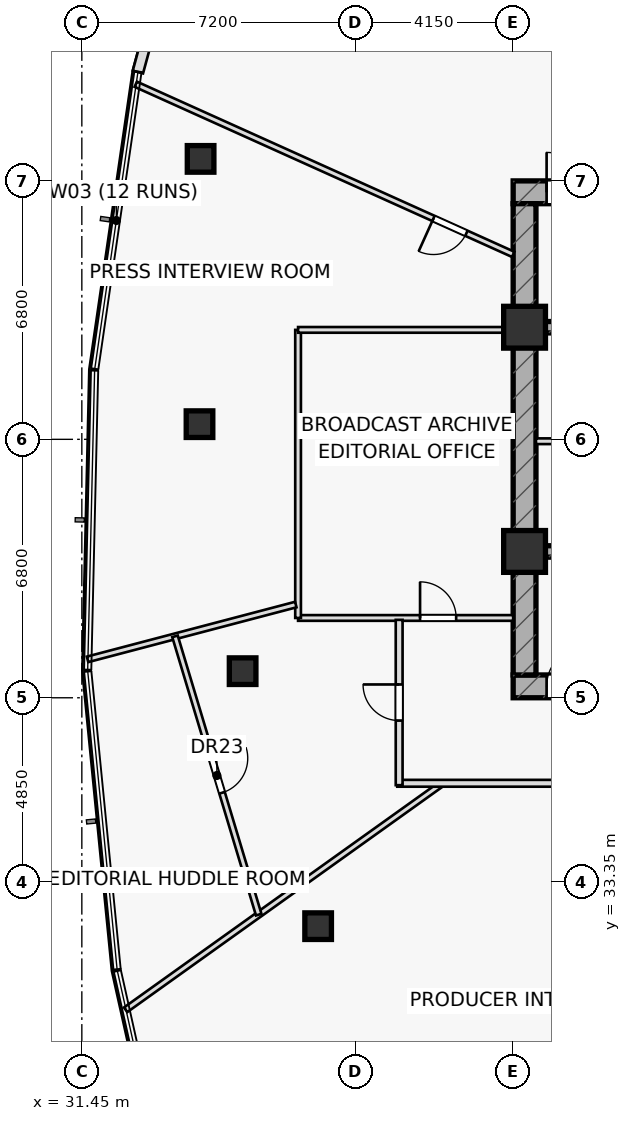
"""IFC4 building model, lengths in metres.
Left out: names, types, materials, properties, quantities, classifications, styles, units other than length and angle.
Written with IfcOpenShell. Run it as: python <this file> out.ifc"""

import sys

from ifc_helpers import new_model, si_unit, direction, frame, frame_2d, origin, origin_2d, place, context, subcontext, project, spatial, rectangle, hollow_rectangle, extrude, element, fill, save


model = new_model("IFC4")
c1 = context("Model", 3, precision=1e-05, world=origin(), true_north=direction((0.0, 1.0)))
c2 = subcontext(c1, "Body", "Model", "MODEL_VIEW")
j1 = project(units=[si_unit("LENGTHUNIT", "METRE"), si_unit("PLANEANGLEUNIT", "RADIAN")], contexts=[c1])
p1 = place(None, origin())
s1 = spatial("IfcSite", under=j1, at=p1, CompositionType="ELEMENT")
p2 = place(p1, origin())
s2 = spatial("IfcBuilding", under=s1, at=p2, CompositionType="ELEMENT")
p3 = place(p2, frame((0.0, 0.0, 138.7)))
s3 = spatial("IfcBuildingStorey", under=s2, at=p3, CompositionType="ELEMENT", Elevation=138.7)
p4 = place(p3, frame((42.8, 51.5, 0.0), z_axis=(0.0, 0.0, 1.0), x_axis=(1.0, 0.0, 0.0)))
e1 = element("IfcWall", 1, at=p4, inside=s3, PredefinedType="SHEAR", context=c2, shape_type="SweptSolid", body=[
    extrude(rectangle(XDim=14.4, YDim=0.6, at=frame_2d((7.2, 0.0))), origin(), (0.0, 0.0, 1.0), 3.55),
])
p5 = place(p4, frame((0.88, 0.0, 0.0)))
e2 = element("IfcOpeningElement", 2, at=p5, cuts=e1, PredefinedType="OPENING", context=c2, shape_type="SweptSolid", body=[
    extrude(rectangle(XDim=1.05, YDim=2.2, at=frame_2d((0.525, 1.1))), frame((0.0, 0.31, 0.0), z_axis=(0.0, -1.0, 0.0), x_axis=(1.0, 0.0, 0.0)), (0.0, 0.0, 1.0), 0.62),
])
p6 = place(p3, frame((42.8, 38.5, 0.0), z_axis=(0.0, 0.0, 1.0), x_axis=(1.0, 0.0, 0.0)))
e3 = element("IfcWall", 3, at=p6, inside=s3, PredefinedType="SHEAR", context=c2, shape_type="SweptSolid", body=[
    extrude(rectangle(XDim=14.4, YDim=0.6, at=frame_2d((7.2, 0.0))), origin(), (0.0, 0.0, 1.0), 3.55),
])
p7 = place(p6, frame((0.88, 0.0, 0.0)))
e4 = element("IfcOpeningElement", 4, at=p7, cuts=e3, PredefinedType="OPENING", context=c2, shape_type="SweptSolid", body=[
    extrude(rectangle(XDim=1.05, YDim=2.2, at=frame_2d((0.525, 1.1))), frame((0.0, 0.31, 0.0), z_axis=(0.0, -1.0, 0.0), x_axis=(1.0, 0.0, 0.0)), (0.0, 0.0, 1.0), 0.62),
])
p8 = place(p3, frame((43.1, 38.8, 0.0), z_axis=(0.0, 0.0, 1.0), x_axis=(0.0, 1.0, 0.0)))
e5 = element("IfcWall", 5, at=p8, inside=s3, PredefinedType="SHEAR", context=c2, shape_type="SweptSolid", body=[
    extrude(rectangle(XDim=12.4, YDim=0.6, at=frame_2d((6.2, 0.0))), origin(), (0.0, 0.0, 1.0), 3.55),
])
p9 = place(p3, frame((43.4, 47.95, 0.0), z_axis=(0.0, 0.0, 1.0), x_axis=(1.0, 0.0, 0.0)))
e6 = element("IfcWall", 6, at=p9, inside=s3, PredefinedType="SHEAR", context=c2, shape_type="SweptSolid", body=[
    extrude(rectangle(XDim=13.2, YDim=0.3, at=frame_2d((6.6, 0.0))), origin(), (0.0, 0.0, 1.0), 3.55),
])
p10 = place(p9, frame((8.345, 0.0, 0.0)))
e7 = element("IfcOpeningElement", 7, at=p10, cuts=e6, PredefinedType="OPENING", context=c2, shape_type="SweptSolid", body=[
    extrude(rectangle(XDim=1.15, YDim=2.2, at=frame_2d((0.575, 1.1))), frame((0.0, 0.16, 0.0), z_axis=(0.0, -1.0, 0.0), x_axis=(1.0, 0.0, 0.0)), (0.0, 0.0, 1.0), 0.32),
])
p11 = place(p9, frame((10.065, 0.0, 0.0)))
e8 = element("IfcOpeningElement", 8, at=p11, cuts=e6, PredefinedType="OPENING", context=c2, shape_type="SweptSolid", body=[
    extrude(rectangle(XDim=1.15, YDim=2.2, at=frame_2d((0.575, 1.1))), frame((0.0, 0.16, 0.0), z_axis=(0.0, -1.0, 0.0), x_axis=(1.0, 0.0, 0.0)), (0.0, 0.0, 1.0), 0.32),
])
p12 = place(p9, frame((11.645, 0.0, 0.0)))
e9 = element("IfcOpeningElement", 9, at=p12, cuts=e6, PredefinedType="OPENING", context=c2, shape_type="SweptSolid", body=[
    extrude(rectangle(XDim=1.15, YDim=2.2, at=frame_2d((0.575, 1.1))), frame((0.0, 0.16, 0.0), z_axis=(0.0, -1.0, 0.0), x_axis=(1.0, 0.0, 0.0)), (0.0, 0.0, 1.0), 0.32),
])
p13 = place(p3, frame((43.4, 42.05, 0.0), z_axis=(0.0, 0.0, 1.0), x_axis=(1.0, 0.0, 0.0)))
e10 = element("IfcWall", 10, at=p13, inside=s3, PredefinedType="SHEAR", context=c2, shape_type="SweptSolid", body=[
    extrude(rectangle(XDim=13.2, YDim=0.3, at=frame_2d((6.6, 0.0))), origin(), (0.0, 0.0, 1.0), 3.55),
])
p14 = place(p13, frame((8.37, 0.0, 0.0)))
e11 = element("IfcOpeningElement", 11, at=p14, cuts=e10, PredefinedType="OPENING", context=c2, shape_type="SweptSolid", body=[
    extrude(rectangle(XDim=1.1, YDim=2.15, at=frame_2d((0.55, 1.075))), frame((0.0, 0.16, 0.0), z_axis=(0.0, -1.0, 0.0), x_axis=(1.0, 0.0, 0.0)), (0.0, 0.0, 1.0), 0.32),
])
p15 = place(p13, frame((10.09, 0.0, 0.0)))
e12 = element("IfcOpeningElement", 12, at=p15, cuts=e10, PredefinedType="OPENING", context=c2, shape_type="SweptSolid", body=[
    extrude(rectangle(XDim=1.1, YDim=2.15, at=frame_2d((0.55, 1.075))), frame((0.0, 0.16, 0.0), z_axis=(0.0, -1.0, 0.0), x_axis=(1.0, 0.0, 0.0)), (0.0, 0.0, 1.0), 0.32),
])
p16 = place(p13, frame((11.83, 0.0, 0.0)))
e13 = element("IfcOpeningElement", 13, at=p16, cuts=e10, PredefinedType="OPENING", context=c2, shape_type="SweptSolid", body=[
    extrude(rectangle(XDim=1.1, YDim=2.15, at=frame_2d((0.55, 1.075))), frame((0.0, 0.16, 0.0), z_axis=(0.0, -1.0, 0.0), x_axis=(1.0, 0.0, 0.0)), (0.0, 0.0, 1.0), 0.32),
])
for number, where, z_axis, x_axis in (
    (14, (43.1, 47.95, 0.0), (0.0, 0.0, 1.0), (1.0, 0.0, 0.0)),
    (15, (43.1, 42.05, 0.0), (0.0, 0.0, 1.0), (1.0, 0.0, 0.0)),
):
    element("IfcColumn", number, at=place(p3, frame(where, z_axis=z_axis, x_axis=x_axis)), inside=s3, PredefinedType="COLUMN", context=c2, shape_type="SweptSolid", body=[
        extrude(rectangle(XDim=1.1, YDim=1.1, at=origin_2d()), origin(), (0.0, 0.0, 1.0), 3.55),
    ])
for number, where, z_axis, x_axis in (
    (16, (34.575, 52.379, 0.0), (0.0, 0.0, 1.0), (1.0, 0.0, 0.0)),
    (17, (34.546, 45.399, 0.0), (0.0, 0.0, 1.0), (1.0, 0.0, 0.0)),
    (18, (35.681, 38.9, 0.0), (0.0, 0.0, 1.0), (1.0, 0.0, 0.0)),
    (19, (37.668, 32.19, 0.0), (0.0, 0.0, 1.0), (1.0, 0.0, 0.0)),
):
    element("IfcColumn", number, at=place(p3, frame(where, z_axis=z_axis, x_axis=x_axis)), inside=s3, PredefinedType="COLUMN", context=c2, shape_type="SweptSolid", body=[
        extrude(hollow_rectangle(XDim=0.7, YDim=0.7, WallThickness=0.04, at=origin_2d()), origin(), (0.0, 0.0, 1.0), 3.55),
    ])
p17 = place(p3, frame((43.4, 44.95, 0.0), z_axis=(0.0, 0.0, 1.0), x_axis=(1.0, 0.0, 0.0)))
e20 = element("IfcWall", 20, at=p17, inside=s3, PredefinedType="PARTITIONING", context=c2, shape_type="SweptSolid", body=[
    extrude(rectangle(XDim=2.35, YDim=0.15, at=frame_2d((1.175, 0.0))), origin(), (0.0, 0.0, 1.0), 3.55),
])
p18 = place(p3, frame((37.14, 40.3, 0.0), z_axis=(0.0, 0.0, 1.0), x_axis=(1.0, 0.0, 0.0)))
e21 = element("IfcWall", 21, at=p18, inside=s3, PredefinedType="PARTITIONING", context=c2, shape_type="SweptSolid", body=[
    extrude(rectangle(XDim=5.66, YDim=0.15, at=frame_2d((2.83, 0.0))), origin(), (0.0, 0.0, 1.0), 3.55),
])
p19 = place(p18, frame((3.21, 0.0, 0.0)))
e22 = element("IfcOpeningElement", 22, at=p19, cuts=e21, PredefinedType="OPENING", context=c2, shape_type="SweptSolid", body=[
    extrude(rectangle(XDim=0.95, YDim=2.05, at=frame_2d((0.475, 1.025))), frame((0.0, 0.085, 0.0), z_axis=(0.0, -1.0, 0.0), x_axis=(1.0, 0.0, 0.0)), (0.0, 0.0, 1.0), 0.17),
])
p20 = place(p3, frame((37.14, 40.3, 0.0), z_axis=(0.0, 0.0, 1.0), x_axis=(0.0, 1.0, 0.0)))
e23 = element("IfcWall", 23, at=p20, inside=s3, PredefinedType="PARTITIONING", context=c2, shape_type="SweptSolid", body=[
    extrude(rectangle(XDim=7.58, YDim=0.15, at=frame_2d((3.79, 0.0))), origin(), (0.0, 0.0, 1.0), 2.835),
])
p21 = place(p3, frame((37.14, 47.88, 0.0), z_axis=(0.0, 0.0, 1.0), x_axis=(1.0, 0.0, 0.0)))
e24 = element("IfcWall", 24, at=p21, inside=s3, PredefinedType="PARTITIONING", context=c2, shape_type="SweptSolid", body=[
    extrude(rectangle(XDim=5.66, YDim=0.15, at=frame_2d((2.83, 0.0))), origin(), (0.0, 0.0, 1.0), 2.835),
])
p22 = place(p3, frame((42.8, 49.867, 0.0), z_axis=(0.0, 0.0, 1.0), x_axis=(-0.911695751271, 0.410865984372, 0.0)))
e25 = element("IfcWall", 25, at=p22, inside=s3, PredefinedType="PARTITIONING", context=c2, shape_type="SweptSolid", body=[
    extrude(rectangle(XDim=10.893, YDim=0.15, at=frame_2d((5.447, 0.0))), origin(), (0.0, 0.0, 1.0), 2.835),
])
p23 = place(p22, frame((1.35, 0.0, 0.0)))
e26 = element("IfcOpeningElement", 26, at=p23, cuts=e25, PredefinedType="OPENING", context=c2, shape_type="SweptSolid", body=[
    extrude(rectangle(XDim=0.95, YDim=2.05, at=frame_2d((0.475, 1.025))), frame((0.0, 0.085, 0.0), z_axis=(0.0, -1.0, 0.0), x_axis=(1.0, 0.0, 0.0)), (0.0, 0.0, 1.0), 0.17),
])
p24 = place(p3, frame((37.08, 40.653, 0.0), z_axis=(0.0, 0.0, 1.0), x_axis=(-0.967070072221, -0.254510265833, 0.0)))
e27 = element("IfcWall", 27, at=p24, inside=s3, PredefinedType="PARTITIONING", context=c2, shape_type="SweptSolid", body=[
    extrude(rectangle(XDim=5.666, YDim=0.15, at=frame_2d((2.833, 0.0))), origin(), (0.0, 0.0, 1.0), 2.975),
])
p25 = place(p3, frame((40.94, 35.95, 0.0), z_axis=(0.0, 0.0, 1.0), x_axis=(-0.813525786519, -0.581528842508, 0.0)))
e28 = element("IfcWall", 28, at=p25, inside=s3, PredefinedType="PARTITIONING", context=c2, shape_type="SweptSolid", body=[
    extrude(rectangle(XDim=10.249, YDim=0.15, at=frame_2d((5.125, 0.0))), origin(), (0.0, 0.0, 1.0), 2.835),
])
p26 = place(p3, frame((33.902, 39.816, 0.0), z_axis=(0.0, 0.0, 1.0), x_axis=(0.288006845978, -0.957628349972, 0.0)))
e29 = element("IfcWall", 29, at=p26, inside=s3, PredefinedType="PARTITIONING", context=c2, shape_type="SweptSolid", body=[
    extrude(rectangle(XDim=7.647, YDim=0.15, at=frame_2d((3.823, 0.0))), origin(), (0.0, 0.0, 1.0), 3.55),
])
p27 = place(p26, frame((3.348, 0.0, 0.0)))
e30 = element("IfcOpeningElement", 30, at=p27, cuts=e29, PredefinedType="OPENING", context=c2, shape_type="SweptSolid", body=[
    extrude(rectangle(XDim=0.95, YDim=2.05, at=frame_2d((0.475, 1.025))), frame((0.0, 0.085, 0.0), z_axis=(0.0, -1.0, 0.0), x_axis=(1.0, 0.0, 0.0)), (0.0, 0.0, 1.0), 0.17),
])
p28 = place(p3, frame((59.5, 35.95, 0.0), z_axis=(0.0, 0.0, 1.0), x_axis=(-1.0, 0.0, 0.0)))
e31 = element("IfcWall", 31, at=p28, inside=s3, PredefinedType="PARTITIONING", context=c2, shape_type="SweptSolid", body=[
    extrude(rectangle(XDim=19.75, YDim=0.18, at=frame_2d((9.875, 0.0))), origin(), (0.0, 0.0, 1.0), 2.835),
])
p29 = place(p28, frame((2.304, 0.0, 0.0)))
e32 = element("IfcOpeningElement", 32, at=p29, cuts=e31, PredefinedType="OPENING", context=c2, shape_type="SweptSolid", body=[
    extrude(rectangle(XDim=0.95, YDim=2.05, at=frame_2d((0.475, 1.025))), frame((0.0, 0.1, 0.0), z_axis=(0.0, -1.0, 0.0), x_axis=(1.0, 0.0, 0.0)), (0.0, 0.0, 1.0), 0.2),
])
p30 = place(p28, frame((11.55, 0.0, 0.0)))
e33 = element("IfcOpeningElement", 33, at=p30, cuts=e31, PredefinedType="OPENING", context=c2, shape_type="SweptSolid", body=[
    extrude(rectangle(XDim=0.95, YDim=2.05, at=frame_2d((0.475, 1.025))), frame((0.0, 0.1, 0.0), z_axis=(0.0, -1.0, 0.0), x_axis=(1.0, 0.0, 0.0)), (0.0, 0.0, 1.0), 0.2),
])
p31 = place(p3, frame((39.8, 35.9, 0.0), z_axis=(0.0, 0.0, 1.0), x_axis=(0.0, 1.0, 0.0)))
e34 = element("IfcWall", 34, at=p31, inside=s3, PredefinedType="PARTITIONING", context=c2, shape_type="SweptSolid", body=[
    extrude(rectangle(XDim=4.35, YDim=0.18, at=frame_2d((2.175, 0.0))), origin(), (0.0, 0.0, 1.0), 2.835),
])
p32 = place(p31, frame((1.7, 0.0, 0.0)))
e35 = element("IfcOpeningElement", 35, at=p32, cuts=e34, PredefinedType="OPENING", context=c2, shape_type="SweptSolid", body=[
    extrude(rectangle(XDim=0.95, YDim=2.05, at=frame_2d((0.475, 1.025))), frame((0.0, 0.1, 0.0), z_axis=(0.0, -1.0, 0.0), x_axis=(1.0, 0.0, 0.0)), (0.0, 0.0, 1.0), 0.2),
])
p33 = place(p3, frame((35.01, 62.324, 0.0), z_axis=(0.0, 0.0, 1.0), x_axis=(-0.262651548334, -0.964890752447, 0.0)))
e36 = element("IfcWall", 36, at=p33, inside=s3, PredefinedType="STANDARD", context=c2, shape_type="SweptSolid", body=[
    extrude(rectangle(XDim=7.938, YDim=0.28, at=frame_2d((3.969, 0.0))), origin(), (0.0, 0.0, 1.0), 3.55),
])
p34 = place(p5, origin())
e37 = element("IfcDoor", 37, at=p34, inside=s3, OperationType="SINGLE_SWING_LEFT", PredefinedType="DOOR", context=c2, shape_type="SweptSolid", body=[
    extrude(rectangle(XDim=1.05, YDim=2.2, at=frame_2d((0.525, 1.1))), frame((0.0, 0.025, 0.0), z_axis=(0.0, -1.0, 0.0), x_axis=(1.0, 0.0, 0.0)), (0.0, 0.0, 1.0), 0.05),
])
fill(e2, e37)
p35 = place(p7, origin())
e38 = element("IfcDoor", 38, at=p35, inside=s3, OperationType="SINGLE_SWING_RIGHT", PredefinedType="DOOR", context=c2, shape_type="SweptSolid", body=[
    extrude(rectangle(XDim=1.05, YDim=2.2, at=frame_2d((0.525, 1.1))), frame((0.0, 0.025, 0.0), z_axis=(0.0, -1.0, 0.0), x_axis=(1.0, 0.0, 0.0)), (0.0, 0.0, 1.0), 0.05),
])
fill(e4, e38)
p36 = place(p19, origin())
e39 = element("IfcDoor", 39, at=p36, inside=s3, OperationType="SINGLE_SWING_LEFT", PredefinedType="DOOR", context=c2, shape_type="SweptSolid", body=[
    extrude(rectangle(XDim=0.95, YDim=2.05, at=frame_2d((0.475, 1.025))), frame((0.0, 0.025, 0.0), z_axis=(0.0, -1.0, 0.0), x_axis=(1.0, 0.0, 0.0)), (0.0, 0.0, 1.0), 0.05),
])
fill(e22, e39)
p37 = place(p23, origin())
e40 = element("IfcDoor", 40, at=p37, inside=s3, OperationType="SINGLE_SWING_RIGHT", PredefinedType="DOOR", context=c2, shape_type="SweptSolid", body=[
    extrude(rectangle(XDim=0.95, YDim=2.05, at=frame_2d((0.475, 1.025))), frame((0.0, 0.025, 0.0), z_axis=(0.0, -1.0, 0.0), x_axis=(1.0, 0.0, 0.0)), (0.0, 0.0, 1.0), 0.05),
])
fill(e26, e40)
p38 = place(p27, origin())
e41 = element("IfcDoor", 41, at=p38, inside=s3, OperationType="SINGLE_SWING_LEFT", PredefinedType="DOOR", context=c2, shape_type="SweptSolid", body=[
    extrude(rectangle(XDim=0.95, YDim=2.05, at=frame_2d((0.475, 1.025))), frame((0.0, 0.025, 0.0), z_axis=(0.0, -1.0, 0.0), x_axis=(1.0, 0.0, 0.0)), (0.0, 0.0, 1.0), 0.05),
])
fill(e30, e41)
p39 = place(p32, origin())
e42 = element("IfcDoor", 42, at=p39, inside=s3, OperationType="SINGLE_SWING_RIGHT", PredefinedType="DOOR", context=c2, shape_type="SweptSolid", body=[
    extrude(rectangle(XDim=0.95, YDim=2.05, at=frame_2d((0.475, 1.025))), frame((0.0, 0.025, 0.0), z_axis=(0.0, -1.0, 0.0), x_axis=(1.0, 0.0, 0.0)), (0.0, 0.0, 1.0), 0.05),
])
fill(e35, e42)
save(model, sys.argv[1])
